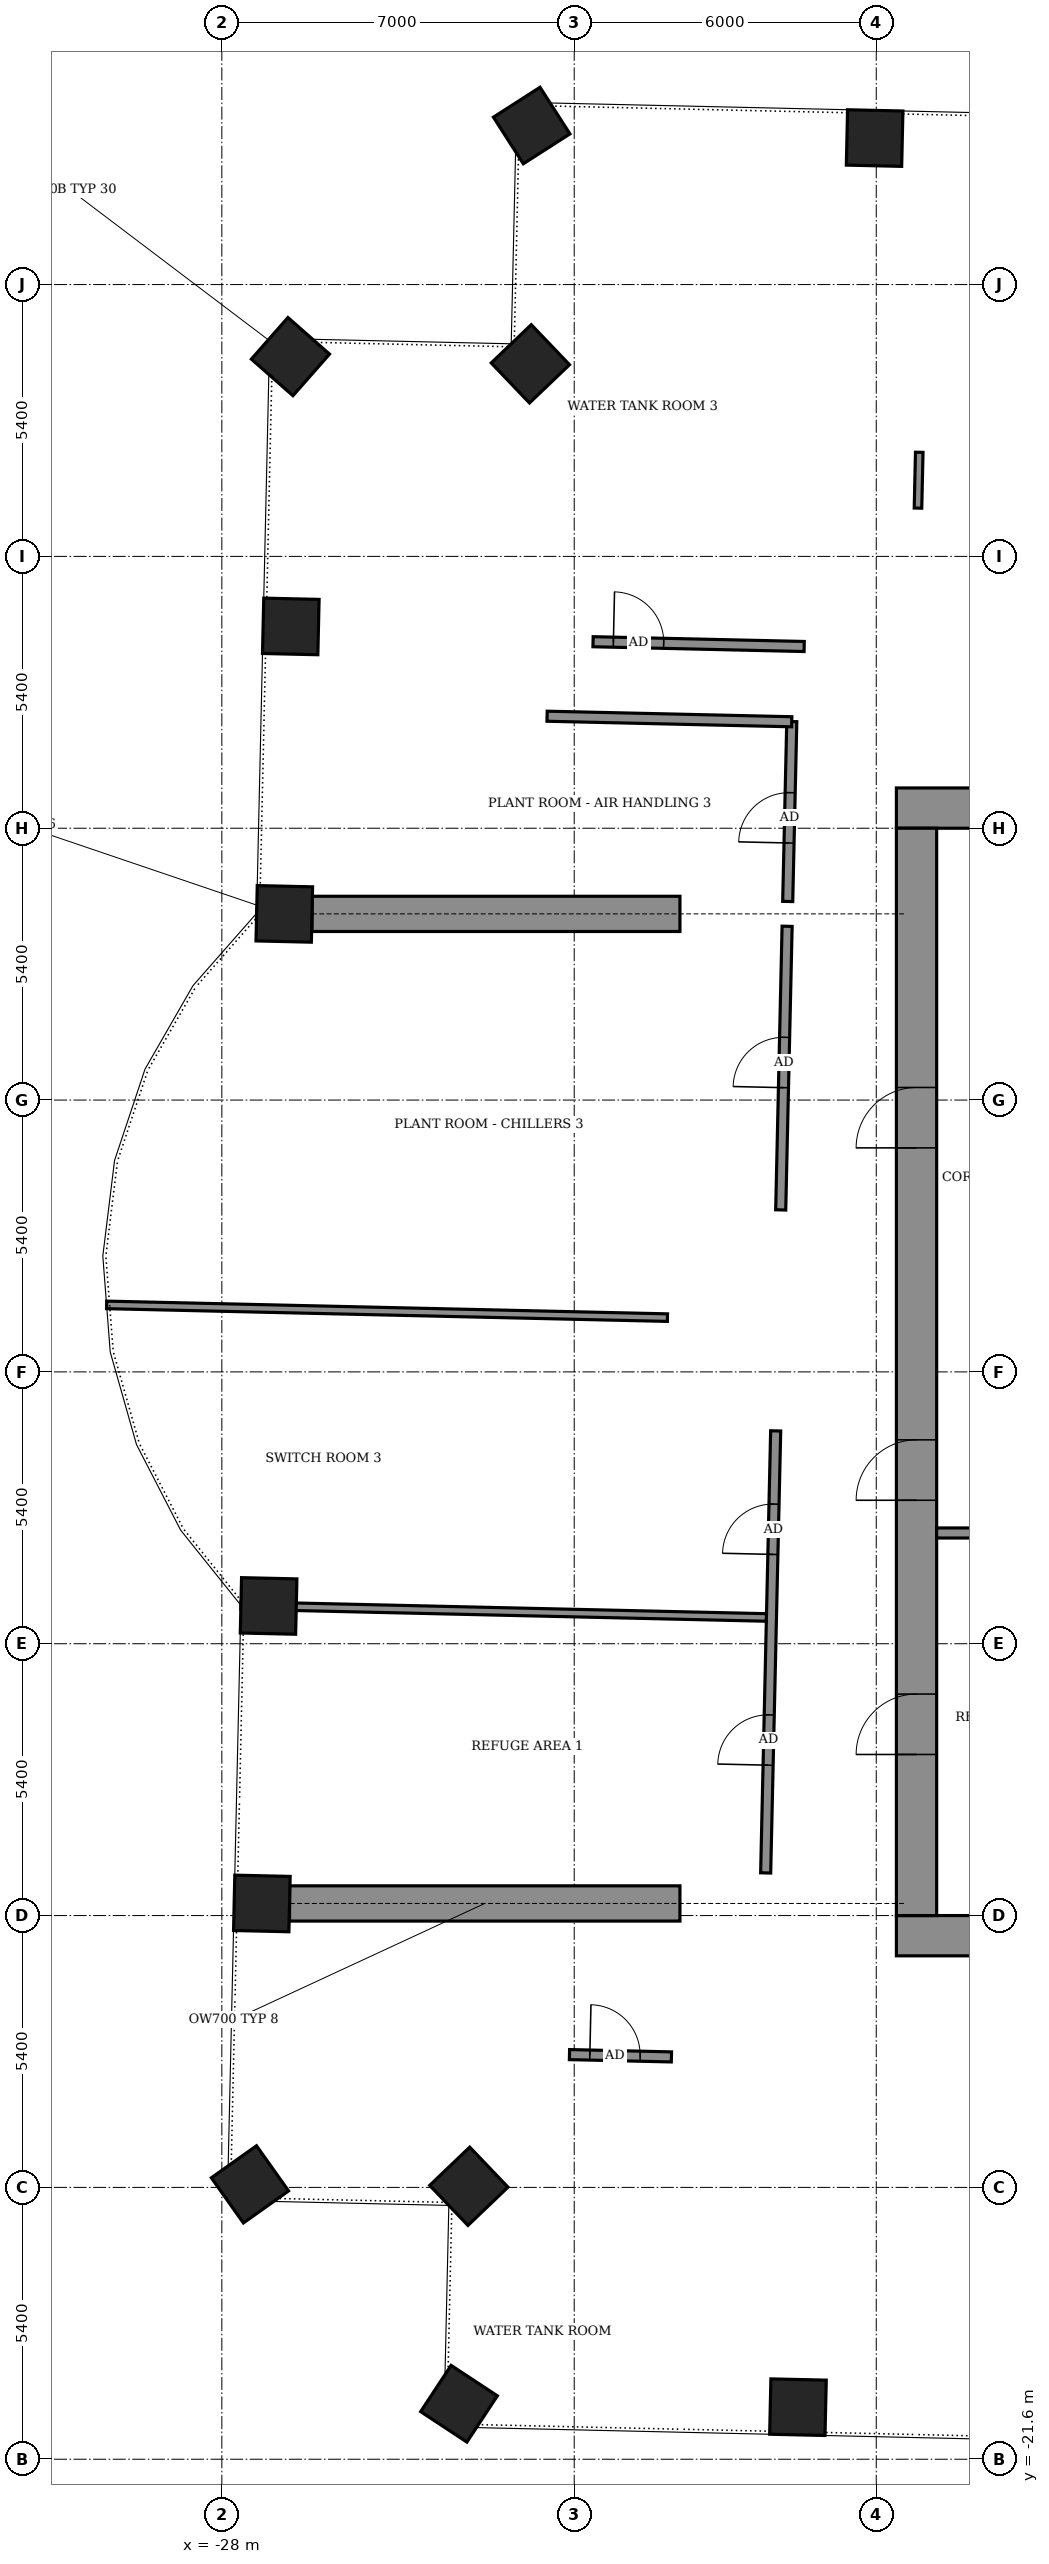
"""IFC4 building model, lengths in metres.
Left out: names, types, materials, properties, quantities, classifications, styles, units other than length and angle.
Written with IfcOpenShell. Run it as: python <this file> out.ifc"""

import sys

from ifc_helpers import new_model, si_unit, direction, frame, frame_2d, origin, origin_2d, place, context, subcontext, project, spatial, rectangle, extrude, element, fill, save


model = new_model("IFC4")
c1 = context("Model", 3, precision=1e-05, world=origin(), true_north=direction((0.0, 1.0)))
c2 = subcontext(c1, "Body", "Model", "MODEL_VIEW")
j1 = project(units=[si_unit("LENGTHUNIT", "METRE"), si_unit("PLANEANGLEUNIT", "RADIAN")], contexts=[c1])
p1 = place(None, origin())
s1 = spatial("IfcSite", under=j1, at=p1, CompositionType="ELEMENT")
p2 = place(p1, origin())
s2 = spatial("IfcBuilding", under=s1, at=p2, CompositionType="ELEMENT")
p3 = place(p2, frame((0.0, 0.0, 219.5)))
s3 = spatial("IfcBuildingStorey", under=s2, at=p3, CompositionType="ELEMENT", Elevation=219.5)
for number, where, z_axis, x_axis in (
    (1, (-27.071, -4.649, -0.55), (0.0, 0.0, 1.0), (-0.023, -1.0, 0.0)),
    (2, (-27.205, -10.56, -0.55), (0.0, 0.0, 1.0), (-0.023, -1.0, 0.0)),
    (3, (-27.441, -16.14, -0.55), (0.0, 0.0, 1.0), (0.579, -0.816, 0.0)),
    (4, (-23.093, -16.178, -0.55), (0.0, 0.0, 1.0), (0.691, -0.723, 0.0)),
    (5, (-23.289, -20.498, -0.55), (0.0, 0.0, 1.0), (0.835, -0.55, 0.0)),
    (6, (-16.555, -20.566, -0.55), (0.0, 0.0, 1.0), (1.0, -0.023, 0.0)),
    (7, (-15.032, 24.51, -0.55), (0.0, 0.0, 1.0), (-1.0, 0.023, 0.0)),
    (8, (-21.845, 24.759, -0.55), (0.0, 0.0, 1.0), (-0.842, -0.54, 0.0)),
    (9, (-21.871, 20.025, -0.55), (0.0, 0.0, 1.0), (-0.723, -0.691, 0.0)),
    (10, (-26.637, 20.169, -0.55), (0.0, 0.0, 1.0), (-0.661, -0.751, 0.0)),
    (11, (-26.63, 14.809, -0.55), (0.0, 0.0, 1.0), (-0.023, -1.0, 0.0)),
    (12, (-26.759, 9.099, -0.55), (0.0, 0.0, 1.0), (-0.023, -1.0, 0.0)),
):
    element("IfcColumn", number, at=place(p3, frame(where, z_axis=z_axis, x_axis=x_axis)), inside=s3, PredefinedType="COLUMN", context=c2, shape_type="SweptSolid", body=[
        extrude(rectangle(XDim=1.1, YDim=1.1, at=origin_2d()), origin(), (0.0, 0.0, 1.0), 7.0),
    ])
p4 = place(p3, frame((-18.9, 9.099, 0.0), z_axis=(0.0, 0.0, 1.0), x_axis=(-1.0, 0.0, 0.0)))
e13 = element("IfcWall", 13, at=p4, inside=s3, PredefinedType="SHEAR", context=c2, shape_type="SweptSolid", body=[
    extrude(rectangle(XDim=7.309, YDim=0.7, at=frame_2d((3.655, 0.0))), origin(), (0.0, 0.0, 1.0), 3.0),
])
p5 = place(p3, frame((-18.9, -10.56, 0.0), z_axis=(0.0, 0.0, 1.0), x_axis=(-1.0, 0.0, 0.0)))
e14 = element("IfcWall", 14, at=p5, inside=s3, PredefinedType="SHEAR", context=c2, shape_type="SweptSolid", body=[
    extrude(rectangle(XDim=7.755, YDim=0.7, at=frame_2d((3.877, 0.0))), origin(), (0.0, 0.0, 1.0), 3.0),
])
p6 = place(p3, frame((-21.094, -13.562, 0.0), z_axis=(0.0, 0.0, 1.0), x_axis=(0.999743202774, -0.022661167365, 0.0)))
e15 = element("IfcWall", 15, at=p6, inside=s3, PredefinedType="PARTITIONING", context=c2, shape_type="SweptSolid", body=[
    extrude(rectangle(XDim=2.025, YDim=0.2, at=frame_2d((1.013, 0.0))), origin(), (0.0, 0.0, 1.0), 6.45),
])
p7 = place(p6, frame((0.404, 0.0, 0.0)))
e16 = element("IfcOpeningElement", 16, at=p7, cuts=e15, PredefinedType="OPENING", context=c2, shape_type="SweptSolid", body=[
    extrude(rectangle(XDim=1.0, YDim=2.1, at=frame_2d((0.5, 1.05))), frame((0.0, 0.11, 0.0), z_axis=(0.0, -1.0, 0.0), x_axis=(1.0, 0.0, 0.0)), (0.0, 0.0, 1.0), 0.22),
])
p8 = place(p3, frame((-17.197, -9.953, 0.0), z_axis=(0.0, 0.0, 1.0), x_axis=(0.022654474612, 0.999743354457, 0.0)))
e17 = element("IfcWall", 17, at=p8, inside=s3, PredefinedType="PARTITIONING", context=c2, shape_type="SweptSolid", body=[
    extrude(rectangle(XDim=8.783, YDim=0.2, at=frame_2d((4.392, 0.0))), origin(), (0.0, 0.0, 1.0), 6.45),
])
p9 = place(p8, frame((6.329, 0.0, 0.0)))
e18 = element("IfcOpeningElement", 18, at=p9, cuts=e17, PredefinedType="OPENING", context=c2, shape_type="SweptSolid", body=[
    extrude(rectangle(XDim=1.0, YDim=2.1, at=frame_2d((0.5, 1.05))), frame((0.0, 0.11, 0.0), z_axis=(0.0, -1.0, 0.0), x_axis=(1.0, 0.0, 0.0)), (0.0, 0.0, 1.0), 0.22),
])
p10 = place(p8, frame((2.141, 0.0, 0.0)))
e19 = element("IfcOpeningElement", 19, at=p10, cuts=e17, PredefinedType="OPENING", context=c2, shape_type="SweptSolid", body=[
    extrude(rectangle(XDim=1.0, YDim=2.1, at=frame_2d((0.5, 1.05))), frame((0.0, 0.11, 0.0), z_axis=(0.0, -1.0, 0.0), x_axis=(1.0, 0.0, 0.0)), (0.0, 0.0, 1.0), 0.22),
])
p11 = place(p3, frame((-27.621, -4.641, 0.0), z_axis=(0.0, 0.0, 1.0), x_axis=(0.999742728106, -0.022682098664, 0.0)))
e20 = element("IfcWall", 20, at=p11, inside=s3, PredefinedType="PARTITIONING", context=c2, shape_type="SweptSolid", body=[
    extrude(rectangle(XDim=10.441, YDim=0.15, at=frame_2d((5.22, 0.0))), origin(), (0.0, 0.0, 1.0), 6.45),
])
p12 = place(p3, frame((-30.289, 1.331, 0.0), z_axis=(0.0, 0.0, 1.0), x_axis=(0.999741903402, -0.022718419464, 0.0)))
e21 = element("IfcWall", 21, at=p12, inside=s3, PredefinedType="PARTITIONING", context=c2, shape_type="SweptSolid", body=[
    extrude(rectangle(XDim=11.144, YDim=0.15, at=frame_2d((5.572, 0.0))), origin(), (0.0, 0.0, 1.0), 5.75),
])
p13 = place(p3, frame((-16.898, 3.218, 0.0), z_axis=(0.0, 0.0, 1.0), x_axis=(0.022527539795, 0.999746222774, 0.0)))
e22 = element("IfcWall", 22, at=p13, inside=s3, PredefinedType="PARTITIONING", context=c2, shape_type="SweptSolid", body=[
    extrude(rectangle(XDim=5.635, YDim=0.2, at=frame_2d((2.818, 0.0))), origin(), (0.0, 0.0, 1.0), 3.0),
])
p14 = place(p13, frame((2.429, 0.0, 0.0)))
e23 = element("IfcOpeningElement", 23, at=p14, cuts=e22, PredefinedType="OPENING", context=c2, shape_type="SweptSolid", body=[
    extrude(rectangle(XDim=1.0, YDim=2.1, at=frame_2d((0.5, 1.05))), frame((0.0, 0.11, 0.0), z_axis=(0.0, -1.0, 0.0), x_axis=(1.0, 0.0, 0.0)), (0.0, 0.0, 1.0), 0.22),
])
p15 = place(p3, frame((-27.309, 9.115, 0.0), z_axis=(0.0, 0.0, 1.0), x_axis=(0.99973677065, -0.022943177842, 0.0)))
e24 = element("IfcWall", 24, at=p15, inside=s3, PredefinedType="PARTITIONING", context=c2, shape_type="SweptSolid", body=[
    extrude(rectangle(XDim=1.0, YDim=0.15, at=frame_2d((0.5, 0.0))), origin(), (0.0, 0.0, 1.0), 6.45),
])
p16 = place(p3, frame((-16.759, 9.345, 0.0), z_axis=(0.0, 0.0, 1.0), x_axis=(0.022673314563, 0.99974292736, 0.0)))
e25 = element("IfcWall", 25, at=p16, inside=s3, PredefinedType="PARTITIONING", context=c2, shape_type="SweptSolid", body=[
    extrude(rectangle(XDim=3.575, YDim=0.2, at=frame_2d((1.788, 0.0))), origin(), (0.0, 0.0, 1.0), 3.0),
])
p17 = place(p16, frame((1.162, 0.0, 0.0)))
e26 = element("IfcOpeningElement", 26, at=p17, cuts=e25, PredefinedType="OPENING", context=c2, shape_type="SweptSolid", body=[
    extrude(rectangle(XDim=1.0, YDim=2.1, at=frame_2d((0.5, 1.05))), frame((0.0, 0.11, 0.0), z_axis=(0.0, -1.0, 0.0), x_axis=(1.0, 0.0, 0.0)), (0.0, 0.0, 1.0), 0.22),
])
p18 = place(p3, frame((-21.539, 13.025, 0.0), z_axis=(0.0, 0.0, 1.0), x_axis=(0.999744602291, -0.022599340485, 0.0)))
e27 = element("IfcWall", 27, at=p18, inside=s3, PredefinedType="PARTITIONING", context=c2, shape_type="SweptSolid", body=[
    extrude(rectangle(XDim=4.861, YDim=0.2, at=frame_2d((2.431, 0.0))), origin(), (0.0, 0.0, 1.0), 6.45),
])
p19 = place(p3, frame((-20.626, 14.505, 0.0), z_axis=(0.0, 0.0, 1.0), x_axis=(0.999743724863, -0.022638122648, 0.0)))
e28 = element("IfcWall", 28, at=p19, inside=s3, PredefinedType="PARTITIONING", context=c2, shape_type="SweptSolid", body=[
    extrude(rectangle(XDim=4.195, YDim=0.2, at=frame_2d((2.098, 0.0))), origin(), (0.0, 0.0, 1.0), 6.45),
])
p20 = place(p19, frame((0.404, 0.0, 0.0)))
e29 = element("IfcOpeningElement", 29, at=p20, cuts=e28, PredefinedType="OPENING", context=c2, shape_type="SweptSolid", body=[
    extrude(rectangle(XDim=1.0, YDim=2.1, at=frame_2d((0.5, 1.05))), frame((0.0, 0.11, 0.0), z_axis=(0.0, -1.0, 0.0), x_axis=(1.0, 0.0, 0.0)), (0.0, 0.0, 1.0), 0.22),
])
p21 = place(p3, frame((-14.171, 17.159, 0.0), z_axis=(0.0, 0.0, 1.0), x_axis=(0.022446467252, 0.999748046314, 0.0)))
e30 = element("IfcWall", 30, at=p21, inside=s3, PredefinedType="PARTITIONING", context=c2, shape_type="SweptSolid", body=[
    extrude(rectangle(XDim=1.109, YDim=0.15, at=frame_2d((0.555, 0.0))), origin(), (0.0, 0.0, 1.0), 6.45),
])
for number, where, z_axis, x_axis in (
    (31, (-14.6, -11.2, 0.0), (0.0, 0.0, 1.0), (1.0, 0.0, 0.0)),
    (32, (-14.6, 11.2, 0.0), (0.0, 0.0, 1.0), (1.0, 0.0, 0.0)),
):
    element("IfcWall", number, at=place(p3, frame(where, z_axis=z_axis, x_axis=x_axis)), inside=s3, PredefinedType="SHEAR", context=c2, shape_type="SweptSolid", body=[
        extrude(rectangle(XDim=29.2, YDim=0.8, at=frame_2d((14.6, 0.0))), origin(), (0.0, 0.0, 1.0), 7.0),
    ])
p22 = place(p3, frame((-14.2, -10.8, 0.0), z_axis=(0.0, 0.0, 1.0), x_axis=(0.0, 1.0, 0.0)))
e33 = element("IfcWall", 33, at=p22, inside=s3, PredefinedType="SHEAR", context=c2, shape_type="SweptSolid", body=[
    extrude(rectangle(XDim=21.6, YDim=0.8, at=frame_2d((10.8, 0.0))), origin(), (0.0, 0.0, 1.0), 7.0),
])
p23 = place(p22, frame((8.25, 0.0, 0.0)))
e34 = element("IfcOpeningElement", 34, at=p23, cuts=e33, PredefinedType="OPENING", context=c2, shape_type="SweptSolid", body=[
    extrude(rectangle(XDim=1.2, YDim=2.1, at=frame_2d((0.6, 1.05))), frame((0.0, 0.41, 0.0), z_axis=(0.0, -1.0, 0.0), x_axis=(1.0, 0.0, 0.0)), (0.0, 0.0, 1.0), 0.82),
])
p24 = place(p22, frame((15.25, 0.0, 0.0)))
e35 = element("IfcOpeningElement", 35, at=p24, cuts=e33, PredefinedType="OPENING", context=c2, shape_type="SweptSolid", body=[
    extrude(rectangle(XDim=1.2, YDim=2.1, at=frame_2d((0.6, 1.05))), frame((0.0, 0.41, 0.0), z_axis=(0.0, -1.0, 0.0), x_axis=(1.0, 0.0, 0.0)), (0.0, 0.0, 1.0), 0.82),
])
p25 = place(p22, frame((3.2, 0.0, 0.0)))
e36 = element("IfcOpeningElement", 36, at=p25, cuts=e33, PredefinedType="OPENING", context=c2, shape_type="SweptSolid", body=[
    extrude(rectangle(XDim=1.2, YDim=2.1, at=frame_2d((0.6, 1.05))), frame((0.0, 0.41, 0.0), z_axis=(0.0, -1.0, 0.0), x_axis=(1.0, 0.0, 0.0)), (0.0, 0.0, 1.0), 0.82),
])
p26 = place(p3, frame((-13.8, -3.2, 0.0), z_axis=(0.0, 0.0, 1.0), x_axis=(1.0, 0.0, 0.0)))
e37 = element("IfcWall", 37, at=p26, inside=s3, PredefinedType="STANDARD", context=c2, shape_type="SweptSolid", body=[
    extrude(rectangle(XDim=2.9, YDim=0.2, at=frame_2d((1.45, 0.0))), origin(), (0.0, 0.0, 1.0), 6.45),
])
p27 = place(p26, frame((0.85, 0.0, 0.0)))
e38 = element("IfcOpeningElement", 38, at=p27, cuts=e37, PredefinedType="OPENING", context=c2, shape_type="SweptSolid", body=[
    extrude(rectangle(XDim=1.2, YDim=2.1, at=frame_2d((0.6, 1.05))), frame((0.0, 0.11, 0.0), z_axis=(0.0, -1.0, 0.0), x_axis=(1.0, 0.0, 0.0)), (0.0, 0.0, 1.0), 0.22),
])
p28 = place(p7, origin())
e39 = element("IfcDoor", 39, at=p28, inside=s3, OperationType="SINGLE_SWING_LEFT", PredefinedType="DOOR", context=c2, shape_type="SweptSolid", body=[
    extrude(rectangle(XDim=1.0, YDim=2.1, at=frame_2d((0.5, 1.05))), frame((0.0, 0.025, 0.0), z_axis=(0.0, -1.0, 0.0), x_axis=(1.0, 0.0, 0.0)), (0.0, 0.0, 1.0), 0.05),
])
fill(e16, e39)
p29 = place(p20, origin())
e40 = element("IfcDoor", 40, at=p29, inside=s3, OperationType="SINGLE_SWING_RIGHT", PredefinedType="DOOR", context=c2, shape_type="SweptSolid", body=[
    extrude(rectangle(XDim=1.0, YDim=2.1, at=frame_2d((0.5, 1.05))), frame((0.0, 0.025, 0.0), z_axis=(0.0, -1.0, 0.0), x_axis=(1.0, 0.0, 0.0)), (0.0, 0.0, 1.0), 0.05),
])
fill(e29, e40)
p30 = place(p17, origin())
e41 = element("IfcDoor", 41, at=p30, inside=s3, OperationType="SINGLE_SWING_LEFT", PredefinedType="DOOR", context=c2, shape_type="SweptSolid", body=[
    extrude(rectangle(XDim=1.0, YDim=2.1, at=frame_2d((0.5, 1.05))), frame((0.0, 0.025, 0.0), z_axis=(0.0, -1.0, 0.0), x_axis=(1.0, 0.0, 0.0)), (0.0, 0.0, 1.0), 0.05),
])
fill(e26, e41)
p31 = place(p14, origin())
e42 = element("IfcDoor", 42, at=p31, inside=s3, OperationType="SINGLE_SWING_RIGHT", PredefinedType="DOOR", context=c2, shape_type="SweptSolid", body=[
    extrude(rectangle(XDim=1.0, YDim=2.1, at=frame_2d((0.5, 1.05))), frame((0.0, 0.025, 0.0), z_axis=(0.0, -1.0, 0.0), x_axis=(1.0, 0.0, 0.0)), (0.0, 0.0, 1.0), 0.05),
])
fill(e23, e42)
p32 = place(p9, origin())
e43 = element("IfcDoor", 43, at=p32, inside=s3, OperationType="SINGLE_SWING_LEFT", PredefinedType="DOOR", context=c2, shape_type="SweptSolid", body=[
    extrude(rectangle(XDim=1.0, YDim=2.1, at=frame_2d((0.5, 1.05))), frame((0.0, 0.025, 0.0), z_axis=(0.0, -1.0, 0.0), x_axis=(1.0, 0.0, 0.0)), (0.0, 0.0, 1.0), 0.05),
])
fill(e18, e43)
p33 = place(p10, origin())
e44 = element("IfcDoor", 44, at=p33, inside=s3, OperationType="SINGLE_SWING_RIGHT", PredefinedType="DOOR", context=c2, shape_type="SweptSolid", body=[
    extrude(rectangle(XDim=1.0, YDim=2.1, at=frame_2d((0.5, 1.05))), frame((0.0, 0.025, 0.0), z_axis=(0.0, -1.0, 0.0), x_axis=(1.0, 0.0, 0.0)), (0.0, 0.0, 1.0), 0.05),
])
fill(e19, e44)
p34 = place(p23, origin())
e45 = element("IfcDoor", 45, at=p34, inside=s3, OperationType="DOUBLE_DOOR_SINGLE_SWING", PredefinedType="DOOR", context=c2, shape_type="SweptSolid", body=[
    extrude(rectangle(XDim=1.2, YDim=2.1, at=frame_2d((0.6, 1.05))), frame((0.0, 0.025, 0.0), z_axis=(0.0, -1.0, 0.0), x_axis=(1.0, 0.0, 0.0)), (0.0, 0.0, 1.0), 0.05),
])
fill(e34, e45)
p35 = place(p24, origin())
e46 = element("IfcDoor", 46, at=p35, inside=s3, OperationType="DOUBLE_DOOR_SINGLE_SWING", PredefinedType="DOOR", context=c2, shape_type="SweptSolid", body=[
    extrude(rectangle(XDim=1.2, YDim=2.1, at=frame_2d((0.6, 1.05))), frame((0.0, 0.025, 0.0), z_axis=(0.0, -1.0, 0.0), x_axis=(1.0, 0.0, 0.0)), (0.0, 0.0, 1.0), 0.05),
])
fill(e35, e46)
p36 = place(p25, origin())
e47 = element("IfcDoor", 47, at=p36, inside=s3, OperationType="DOUBLE_DOOR_SINGLE_SWING", PredefinedType="DOOR", context=c2, shape_type="SweptSolid", body=[
    extrude(rectangle(XDim=1.2, YDim=2.1, at=frame_2d((0.6, 1.05))), frame((0.0, 0.025, 0.0), z_axis=(0.0, -1.0, 0.0), x_axis=(1.0, 0.0, 0.0)), (0.0, 0.0, 1.0), 0.05),
])
fill(e36, e47)
save(model, sys.argv[1])
